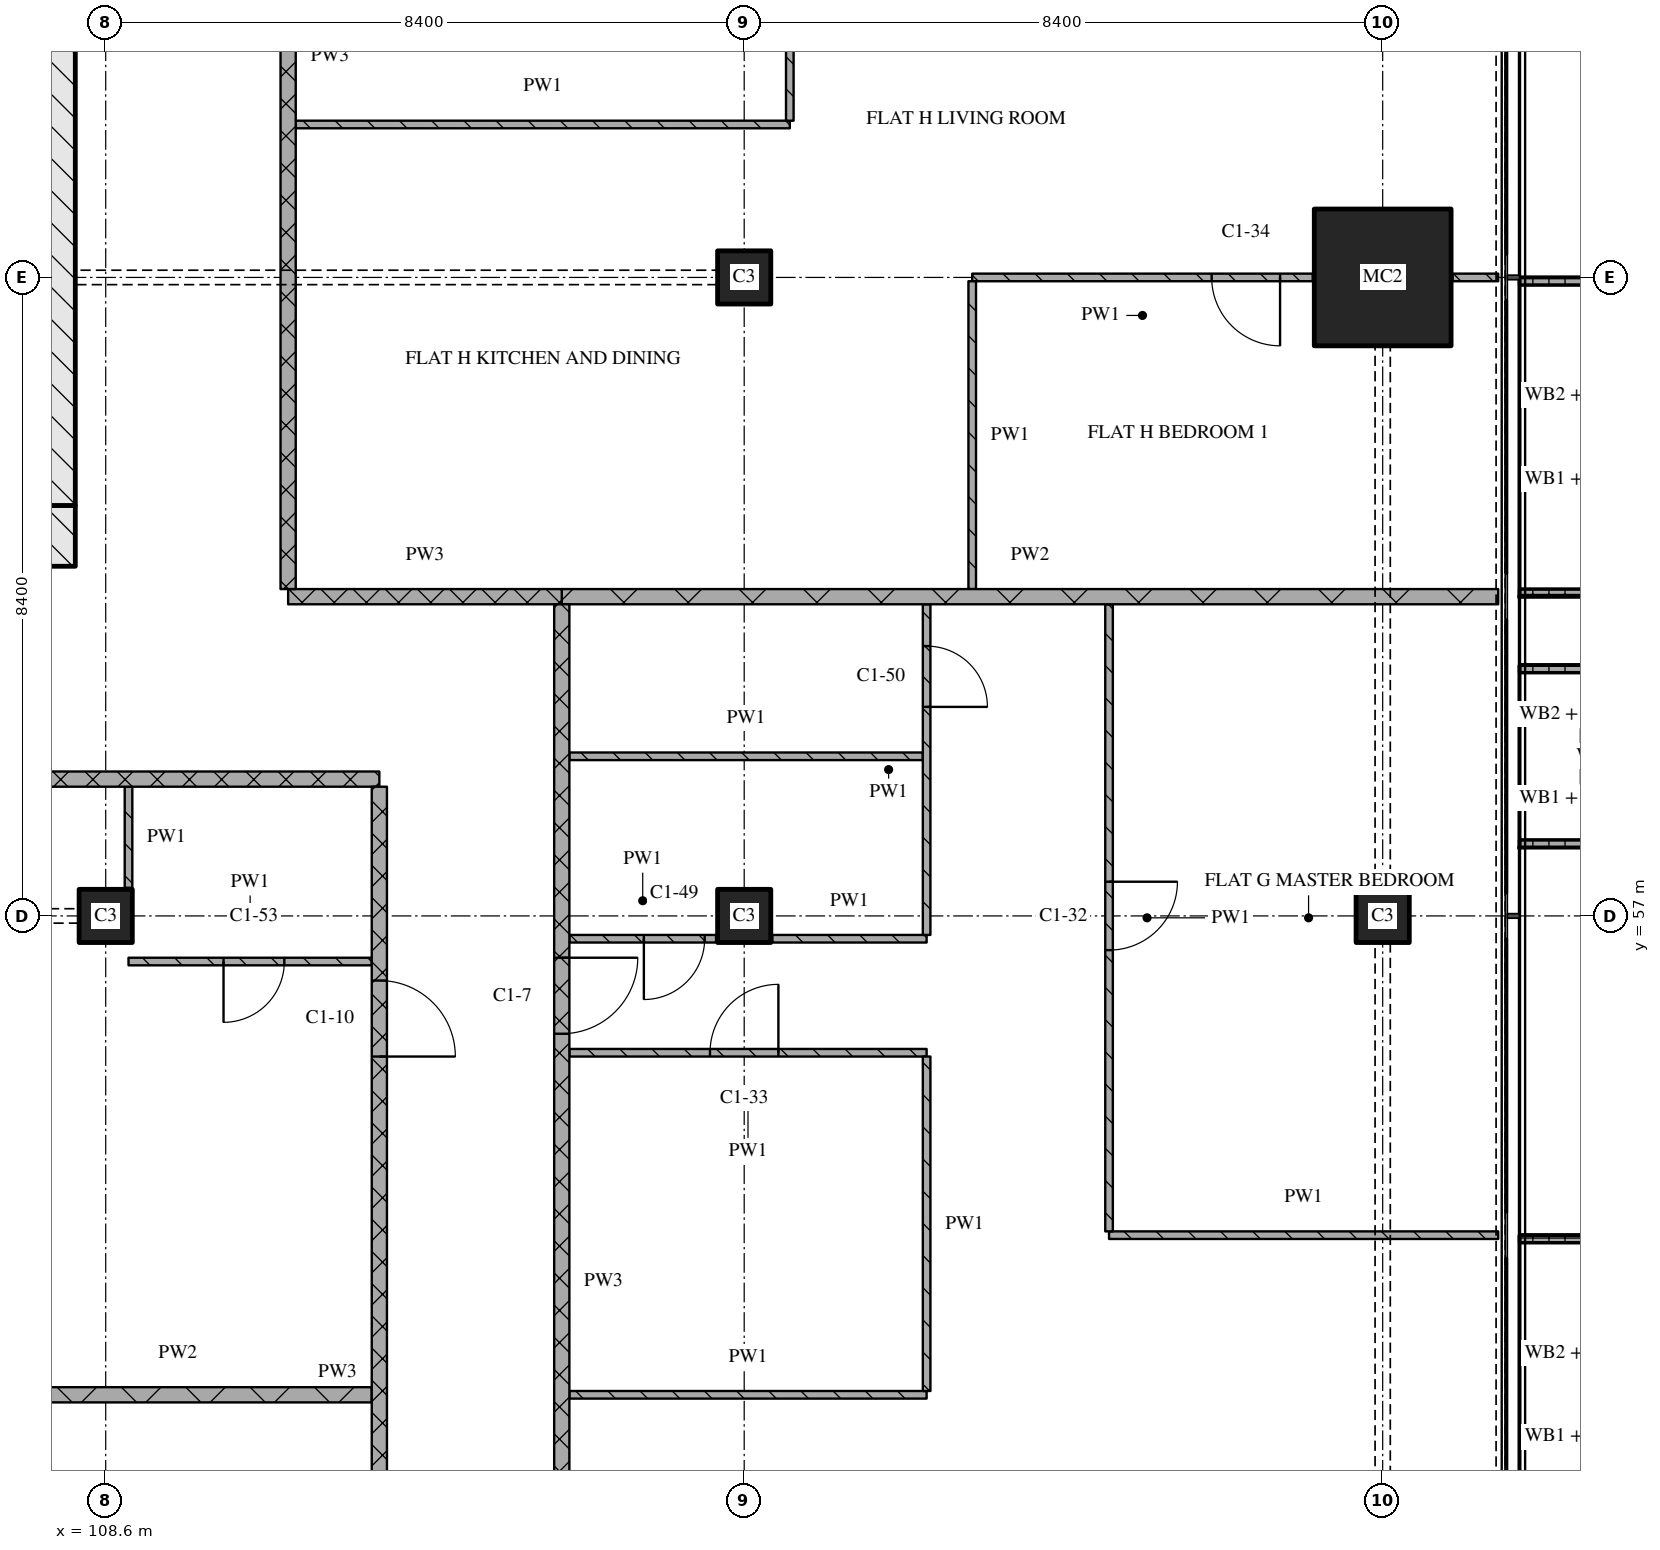
"""IFC4 building model, lengths in metres.
Left out: names, types, materials, properties, quantities, classifications, styles, units other than length and angle.
Written with IfcOpenShell. Run it as: python <this file> out.ifc"""

import sys

from ifc_helpers import new_model, si_unit, direction, frame, frame_2d, origin, origin_2d, place, context, subcontext, project, spatial, polyline, rectangle, outline, extrude, element, fill, save


model = new_model("IFC4")
c1 = context("Model", 3, precision=1e-05, world=origin(), true_north=direction((0.0, 1.0)))
c2 = subcontext(c1, "Body", "Model", "MODEL_VIEW")
j1 = project(units=[si_unit("LENGTHUNIT", "METRE"), si_unit("PLANEANGLEUNIT", "RADIAN")], contexts=[c1])
p1 = place(None, origin())
s1 = spatial("IfcSite", under=j1, at=p1, CompositionType="ELEMENT")
p2 = place(p1, origin())
s2 = spatial("IfcBuilding", under=s1, at=p2, CompositionType="ELEMENT")
p3 = place(p2, frame((0.0, 0.0, 154.65)))
s3 = spatial("IfcBuildingStorey", under=s2, at=p3, CompositionType="ELEMENT", Elevation=154.65)
for number, where, z_axis, x_axis in (
    (1, (108.6, 57.0, 0.0), (0.0, 0.0, 1.0), (1.0, 0.0, 0.0)),
    (2, (117.0, 57.0, 0.0), (0.0, 0.0, 1.0), (1.0, 0.0, 0.0)),
    (3, (117.0, 65.4, 0.0), (0.0, 0.0, 1.0), (1.0, 0.0, 0.0)),
    (4, (125.4, 57.0, 0.0), (0.0, 0.0, 1.0), (1.0, 0.0, 0.0)),
):
    element("IfcColumn", number, at=place(p3, frame(where, z_axis=z_axis, x_axis=x_axis)), inside=s3, PredefinedType="COLUMN", context=c2, shape_type="SweptSolid", body=[
        extrude(rectangle(XDim=0.7, YDim=0.7, at=origin_2d()), origin(), (0.0, 0.0, 1.0), 3.6),
    ])
p4 = place(p3, frame((125.4, 65.4, 0.0), z_axis=(0.0, 0.0, 1.0), x_axis=(1.0, 0.0, 0.0)))
e5 = element("IfcColumn", 5, at=p4, inside=s3, PredefinedType="COLUMN", context=c2, shape_type="SweptSolid", body=[
    extrude(rectangle(XDim=1.8, YDim=1.8, at=origin_2d()), origin(), (0.0, 0.0, 1.0), 3.6),
])
p5 = place(p3, origin())
e6 = element("IfcWall", 6, at=p5, inside=s3, PredefinedType="SOLIDWALL", context=c2, shape_type="SweptSolid", body=[
    extrude(outline(polyline([(127.2, 48.6), (127.2, 48.7), (128.833, 48.7), (128.833, 52.7), (127.2, 52.7), (127.2, 52.8), (128.933, 52.8), (128.933, 48.6), (127.2, 48.6)])), origin(), (0.0, 0.0, 1.0), 1.0),
])
p6 = place(p3, origin())
e7 = element("IfcWall", 7, at=p6, inside=s3, PredefinedType="SOLIDWALL", context=c2, shape_type="SweptSolid", body=[
    extrude(outline(polyline([(127.2, 57.9), (127.2, 58.0), (128.7, 58.0), (128.7, 60.2), (127.2, 60.2), (127.2, 60.3), (128.8, 60.3), (128.8, 57.9), (127.2, 57.9)])), origin(), (0.0, 0.0, 1.0), 1.0),
])
p7 = place(p3, origin())
e8 = element("IfcWall", 8, at=p7, inside=s3, PredefinedType="SOLIDWALL", context=c2, shape_type="SweptSolid", body=[
    extrude(outline(polyline([(127.2, 61.2), (127.2, 61.3), (128.833, 61.3), (128.833, 65.3), (127.2, 65.3), (127.2, 65.4), (128.933, 65.4), (128.933, 61.2), (127.2, 61.2)])), origin(), (0.0, 0.0, 1.0), 1.0),
])
p8 = place(p3, frame((67.0, 62.0, 0.0), z_axis=(0.0, 0.0, 1.0), x_axis=(1.0, 0.0, 0.0)))
e9 = element("IfcWall", 9, at=p8, inside=s3, PredefinedType="SOLIDWALL", context=c2, shape_type="SweptSolid", body=[
    extrude(rectangle(XDim=41.2, YDim=0.8, at=frame_2d((20.6, 0.0))), origin(), (0.0, 0.0, 1.0), 3.32),
])
p9 = place(p8, frame((20.95, 0.0, 0.0)))
e10 = element("IfcOpeningElement", 10, at=p9, cuts=e9, PredefinedType="OPENING", context=c2, shape_type="SweptSolid", body=[
    extrude(rectangle(XDim=1.8, YDim=2.1, at=frame_2d((0.9, 1.05))), frame((0.0, 0.41, 0.0), z_axis=(0.0, -1.0, 0.0), x_axis=(1.0, 0.0, 0.0)), (0.0, 0.0, 1.0), 0.82),
])
p10 = place(p3, frame((107.8, 62.4, 0.0), z_axis=(0.0, 0.0, 1.0), x_axis=(0.0, 1.0, 0.0)))
e11 = element("IfcWall", 11, at=p10, inside=s3, PredefinedType="SOLIDWALL", context=c2, shape_type="SweptSolid", body=[
    extrude(rectangle(XDim=12.0, YDim=0.8, at=frame_2d((6.0, 0.0))), origin(), (0.0, 0.0, 1.0), 3.32),
])
p11 = place(p10, frame((6.45, 0.0, 0.0)))
e12 = element("IfcOpeningElement", 12, at=p11, cuts=e11, PredefinedType="OPENING", context=c2, shape_type="SweptSolid", body=[
    extrude(rectangle(XDim=1.2, YDim=2.1, at=frame_2d((0.6, 1.05))), frame((0.0, 0.41, 0.0), z_axis=(0.0, -1.0, 0.0), x_axis=(1.0, 0.0, 0.0)), (0.0, 0.0, 1.0), 0.82),
])
p12 = place(p3, frame((107.0, 50.7, 0.0), z_axis=(0.0, 0.0, 1.0), x_axis=(1.0, 0.0, 0.0)))
e13 = element("IfcWall", 13, at=p12, inside=s3, PredefinedType="PARTITIONING", context=c2, shape_type="SweptSolid", body=[
    extrude(rectangle(XDim=5.1, YDim=0.2, at=frame_2d((2.55, 0.0))), origin(), (0.0, 0.0, 1.0), 3.32),
])
p13 = place(p3, frame((114.7, 50.7, 0.0), z_axis=(0.0, 0.0, 1.0), x_axis=(1.0, 0.0, 0.0)))
e14 = element("IfcWall", 14, at=p13, inside=s3, PredefinedType="PARTITIONING", context=c2, shape_type="SweptSolid", body=[
    extrude(rectangle(XDim=4.7, YDim=0.1, at=frame_2d((2.35, 0.0))), origin(), (0.0, 0.0, 1.0), 3.32),
])
p14 = place(p3, frame((121.8, 52.8, 0.0), z_axis=(0.0, 0.0, 1.0), x_axis=(1.0, 0.0, 0.0)))
e15 = element("IfcWall", 15, at=p14, inside=s3, PredefinedType="PARTITIONING", context=c2, shape_type="SweptSolid", body=[
    extrude(rectangle(XDim=5.12, YDim=0.1, at=frame_2d((2.56, 0.0))), origin(), (0.0, 0.0, 1.0), 3.32),
])
p15 = place(p3, frame((119.4, 55.2, 0.0), z_axis=(0.0, 0.0, 1.0), x_axis=(-1.0, 0.0, 0.0)))
e16 = element("IfcWall", 16, at=p15, inside=s3, PredefinedType="PARTITIONING", context=c2, shape_type="SweptSolid", body=[
    extrude(rectangle(XDim=4.7, YDim=0.1, at=frame_2d((2.35, 0.0))), origin(), (0.0, 0.0, 1.0), 3.32),
])
p16 = place(p15, frame((1.95, 0.0, 0.0)))
e17 = element("IfcOpeningElement", 17, at=p16, cuts=e16, PredefinedType="OPENING", context=c2, shape_type="SweptSolid", body=[
    extrude(rectangle(XDim=0.9, YDim=2.1, at=frame_2d((0.45, 1.05))), frame((0.0, 0.06, 0.0), z_axis=(0.0, -1.0, 0.0), x_axis=(1.0, 0.0, 0.0)), (0.0, 0.0, 1.0), 0.12),
])
p17 = place(p3, frame((108.9, 56.4, 0.0), z_axis=(0.0, 0.0, 1.0), x_axis=(1.0, 0.0, 0.0)))
e18 = element("IfcWall", 18, at=p17, inside=s3, PredefinedType="PARTITIONING", context=c2, shape_type="SweptSolid", body=[
    extrude(rectangle(XDim=3.2, YDim=0.1, at=frame_2d((1.6, 0.0))), origin(), (0.0, 0.0, 1.0), 3.32),
])
p18 = place(p17, frame((1.25, 0.0, 0.0)))
e19 = element("IfcOpeningElement", 19, at=p18, cuts=e18, PredefinedType="OPENING", context=c2, shape_type="SweptSolid", body=[
    extrude(rectangle(XDim=0.8, YDim=2.1, at=frame_2d((0.4, 1.05))), frame((0.0, 0.06, 0.0), z_axis=(0.0, -1.0, 0.0), x_axis=(1.0, 0.0, 0.0)), (0.0, 0.0, 1.0), 0.12),
])
p19 = place(p3, frame((114.7, 56.7, 0.0), z_axis=(0.0, 0.0, 1.0), x_axis=(1.0, 0.0, 0.0)))
e20 = element("IfcWall", 20, at=p19, inside=s3, PredefinedType="PARTITIONING", context=c2, shape_type="SweptSolid", body=[
    extrude(rectangle(XDim=1.93, YDim=0.1, at=frame_2d((0.965, 0.0))), origin(), (0.0, 0.0, 1.0), 3.32),
])
p20 = place(p19, frame((0.98, 0.0, 0.0)))
e21 = element("IfcOpeningElement", 21, at=p20, cuts=e20, PredefinedType="OPENING", context=c2, shape_type="SweptSolid", body=[
    extrude(rectangle(XDim=0.8, YDim=2.1, at=frame_2d((0.4, 1.05))), frame((0.0, 0.06, 0.0), z_axis=(0.0, -1.0, 0.0), x_axis=(1.0, 0.0, 0.0)), (0.0, 0.0, 1.0), 0.12),
])
p21 = place(p3, frame((117.37, 56.7, 0.0), z_axis=(0.0, 0.0, 1.0), x_axis=(1.0, 0.0, 0.0)))
e22 = element("IfcWall", 22, at=p21, inside=s3, PredefinedType="PARTITIONING", context=c2, shape_type="SweptSolid", body=[
    extrude(rectangle(XDim=2.03, YDim=0.1, at=frame_2d((1.015, 0.0))), origin(), (0.0, 0.0, 1.0), 3.32),
])
p22 = place(p3, frame((101.4, 58.8, 0.0), z_axis=(0.0, 0.0, 1.0), x_axis=(1.0, 0.0, 0.0)))
e23 = element("IfcWall", 23, at=p22, inside=s3, PredefinedType="PARTITIONING", context=c2, shape_type="SweptSolid", body=[
    extrude(rectangle(XDim=10.8, YDim=0.2, at=frame_2d((5.4, 0.0))), origin(), (0.0, 0.0, 1.0), 3.32),
])
p23 = place(p3, frame((114.7, 59.1, 0.0), z_axis=(0.0, 0.0, 1.0), x_axis=(1.0, 0.0, 0.0)))
e24 = element("IfcWall", 24, at=p23, inside=s3, PredefinedType="PARTITIONING", context=c2, shape_type="SweptSolid", body=[
    extrude(rectangle(XDim=4.65, YDim=0.1, at=frame_2d((2.325, 0.0))), origin(), (0.0, 0.0, 1.0), 3.32),
])
p24 = place(p3, frame((111.0, 61.2, 0.0), z_axis=(0.0, 0.0, 1.0), x_axis=(1.0, 0.0, 0.0)))
e25 = element("IfcWall", 25, at=p24, inside=s3, PredefinedType="PARTITIONING", context=c2, shape_type="SweptSolid", body=[
    extrude(rectangle(XDim=3.6, YDim=0.2, at=frame_2d((1.8, 0.0))), origin(), (0.0, 0.0, 1.0), 3.32),
])
p25 = place(p3, frame((114.6, 61.2, 0.0), z_axis=(0.0, 0.0, 1.0), x_axis=(1.0, 0.0, 0.0)))
e26 = element("IfcWall", 26, at=p25, inside=s3, PredefinedType="PARTITIONING", context=c2, shape_type="SweptSolid", body=[
    extrude(rectangle(XDim=12.32, YDim=0.2, at=frame_2d((6.16, 0.0))), origin(), (0.0, 0.0, 1.0), 3.32),
])
p26 = place(p3, frame((124.48, 65.4, 0.0), z_axis=(0.0, 0.0, 1.0), x_axis=(-1.0, 0.0, 0.0)))
e27 = element("IfcWall", 27, at=p26, inside=s3, PredefinedType="PARTITIONING", context=c2, shape_type="SweptSolid", body=[
    extrude(rectangle(XDim=4.48, YDim=0.1, at=frame_2d((2.24, 0.0))), origin(), (0.0, 0.0, 1.0), 3.32),
])
p27 = place(p26, frame((0.43, 0.0, 0.0)))
e28 = element("IfcOpeningElement", 28, at=p27, cuts=e27, PredefinedType="OPENING", context=c2, shape_type="SweptSolid", body=[
    extrude(rectangle(XDim=0.9, YDim=2.1, at=frame_2d((0.45, 1.05))), frame((0.0, 0.06, 0.0), z_axis=(0.0, -1.0, 0.0), x_axis=(1.0, 0.0, 0.0)), (0.0, 0.0, 1.0), 0.12),
])
p28 = place(p3, frame((126.32, 65.4, 0.0), z_axis=(0.0, 0.0, 1.0), x_axis=(1.0, 0.0, 0.0)))
e29 = element("IfcWall", 29, at=p28, inside=s3, PredefinedType="PARTITIONING", context=c2, shape_type="SweptSolid", body=[
    extrude(rectangle(XDim=0.6, YDim=0.1, at=frame_2d((0.3, 0.0))), origin(), (0.0, 0.0, 1.0), 3.32),
])
p29 = place(p3, frame((111.1, 67.412, 0.0), z_axis=(0.0, 0.0, 1.0), x_axis=(1.0, 0.0, 0.0)))
e30 = element("IfcWall", 30, at=p29, inside=s3, PredefinedType="PARTITIONING", context=c2, shape_type="SweptSolid", body=[
    extrude(rectangle(XDim=6.5, YDim=0.1, at=frame_2d((3.25, 0.0))), origin(), (0.0, 0.0, 1.0), 3.32),
])
p30 = place(p3, frame((108.9, 58.7, 0.0), z_axis=(0.0, 0.0, 1.0), x_axis=(0.0, -1.0, 0.0)))
e31 = element("IfcWall", 31, at=p30, inside=s3, PredefinedType="PARTITIONING", context=c2, shape_type="SweptSolid", body=[
    extrude(rectangle(XDim=1.33, YDim=0.1, at=frame_2d((0.665, 0.0))), origin(), (0.0, 0.0, 1.0), 3.32),
])
p31 = place(p3, frame((111.0, 75.32, 0.0), z_axis=(0.0, 0.0, 1.0), x_axis=(0.0, -1.0, 0.0)))
e32 = element("IfcWall", 32, at=p31, inside=s3, PredefinedType="PARTITIONING", context=c2, shape_type="SweptSolid", body=[
    extrude(rectangle(XDim=14.02, YDim=0.2, at=frame_2d((7.01, 0.0))), origin(), (0.0, 0.0, 1.0), 3.32),
])
p32 = place(p31, frame((3.57, 0.0, 0.0)))
e33 = element("IfcOpeningElement", 33, at=p32, cuts=e32, PredefinedType="OPENING", context=c2, shape_type="SweptSolid", body=[
    extrude(rectangle(XDim=1.0, YDim=2.1, at=frame_2d((0.5, 1.05))), frame((0.0, 0.11, 0.0), z_axis=(0.0, -1.0, 0.0), x_axis=(1.0, 0.0, 0.0)), (0.0, 0.0, 1.0), 0.22),
])
p33 = place(p3, frame((112.2, 43.3, 0.0), z_axis=(0.0, 0.0, 1.0), x_axis=(0.0, 1.0, 0.0)))
e34 = element("IfcWall", 34, at=p33, inside=s3, PredefinedType="PARTITIONING", context=c2, shape_type="SweptSolid", body=[
    extrude(rectangle(XDim=15.4, YDim=0.2, at=frame_2d((7.7, 0.0))), origin(), (0.0, 0.0, 1.0), 3.32),
])
p34 = place(p33, frame((11.85, 0.0, 0.0)))
e35 = element("IfcOpeningElement", 35, at=p34, cuts=e34, PredefinedType="OPENING", context=c2, shape_type="SweptSolid", body=[
    extrude(rectangle(XDim=1.0, YDim=2.1, at=frame_2d((0.5, 1.05))), frame((0.0, 0.11, 0.0), z_axis=(0.0, -1.0, 0.0), x_axis=(1.0, 0.0, 0.0)), (0.0, 0.0, 1.0), 0.22),
])
p35 = place(p3, frame((114.6, 61.1, 0.0), z_axis=(0.0, 0.0, 1.0), x_axis=(0.0, -1.0, 0.0)))
e36 = element("IfcWall", 36, at=p35, inside=s3, PredefinedType="PARTITIONING", context=c2, shape_type="SweptSolid", body=[
    extrude(rectangle(XDim=17.8, YDim=0.2, at=frame_2d((8.9, 0.0))), origin(), (0.0, 0.0, 1.0), 3.32),
])
p36 = place(p35, frame((4.65, 0.0, 0.0)))
e37 = element("IfcOpeningElement", 37, at=p36, cuts=e36, PredefinedType="OPENING", context=c2, shape_type="SweptSolid", body=[
    extrude(rectangle(XDim=1.0, YDim=2.1, at=frame_2d((0.5, 1.05))), frame((0.0, 0.11, 0.0), z_axis=(0.0, -1.0, 0.0), x_axis=(1.0, 0.0, 0.0)), (0.0, 0.0, 1.0), 0.22),
])
p37 = place(p3, frame((117.6, 70.45, 0.0), z_axis=(0.0, 0.0, 1.0), x_axis=(0.0, -1.0, 0.0)))
e38 = element("IfcWall", 38, at=p37, inside=s3, PredefinedType="PARTITIONING", context=c2, shape_type="SweptSolid", body=[
    extrude(rectangle(XDim=2.988, YDim=0.1, at=frame_2d((1.494, 0.0))), origin(), (0.0, 0.0, 1.0), 3.32),
])
p38 = place(p3, frame((119.4, 55.15, 0.0), z_axis=(0.0, 0.0, 1.0), x_axis=(0.0, -1.0, 0.0)))
e39 = element("IfcWall", 39, at=p38, inside=s3, PredefinedType="PARTITIONING", context=c2, shape_type="SweptSolid", body=[
    extrude(rectangle(XDim=4.4, YDim=0.1, at=frame_2d((2.2, 0.0))), origin(), (0.0, 0.0, 1.0), 3.32),
])
p39 = place(p3, frame((119.4, 56.75, 0.0), z_axis=(0.0, 0.0, 1.0), x_axis=(0.0, 1.0, 0.0)))
e40 = element("IfcWall", 40, at=p39, inside=s3, PredefinedType="PARTITIONING", context=c2, shape_type="SweptSolid", body=[
    extrude(rectangle(XDim=4.35, YDim=0.1, at=frame_2d((2.175, 0.0))), origin(), (0.0, 0.0, 1.0), 3.32),
])
p40 = place(p39, frame((3.0, 0.0, 0.0)))
e41 = element("IfcOpeningElement", 41, at=p40, cuts=e40, PredefinedType="OPENING", context=c2, shape_type="SweptSolid", body=[
    extrude(rectangle(XDim=0.8, YDim=2.1, at=frame_2d((0.4, 1.05))), frame((0.0, 0.06, 0.0), z_axis=(0.0, -1.0, 0.0), x_axis=(1.0, 0.0, 0.0)), (0.0, 0.0, 1.0), 0.12),
])
p41 = place(p3, frame((120.0, 65.35, 0.0), z_axis=(0.0, 0.0, 1.0), x_axis=(0.0, -1.0, 0.0)))
e42 = element("IfcWall", 42, at=p41, inside=s3, PredefinedType="PARTITIONING", context=c2, shape_type="SweptSolid", body=[
    extrude(rectangle(XDim=4.05, YDim=0.1, at=frame_2d((2.025, 0.0))), origin(), (0.0, 0.0, 1.0), 3.32),
])
p42 = place(p3, frame((121.8, 61.1, 0.0), z_axis=(0.0, 0.0, 1.0), x_axis=(0.0, -1.0, 0.0)))
e43 = element("IfcWall", 43, at=p42, inside=s3, PredefinedType="PARTITIONING", context=c2, shape_type="SweptSolid", body=[
    extrude(rectangle(XDim=8.25, YDim=0.1, at=frame_2d((4.125, 0.0))), origin(), (0.0, 0.0, 1.0), 3.32),
])
p43 = place(p42, frame((3.65, 0.0, 0.0)))
e44 = element("IfcOpeningElement", 44, at=p43, cuts=e43, PredefinedType="OPENING", context=c2, shape_type="SweptSolid", body=[
    extrude(rectangle(XDim=0.9, YDim=2.1, at=frame_2d((0.45, 1.05))), frame((0.0, 0.06, 0.0), z_axis=(0.0, -1.0, 0.0), x_axis=(1.0, 0.0, 0.0)), (0.0, 0.0, 1.0), 0.12),
])
p44 = place(p16, origin())
e45 = element("IfcDoor", 45, at=p44, inside=s3, OperationType="SINGLE_SWING_RIGHT", PredefinedType="DOOR", context=c2, shape_type="SweptSolid", body=[
    extrude(rectangle(XDim=0.9, YDim=2.1, at=frame_2d((0.45, 1.05))), frame((0.0, 0.025, 0.0), z_axis=(0.0, -1.0, 0.0), x_axis=(1.0, 0.0, 0.0)), (0.0, 0.0, 1.0), 0.05),
])
fill(e17, e45)
p45 = place(p18, origin())
e46 = element("IfcDoor", 46, at=p45, inside=s3, OperationType="SINGLE_SWING_RIGHT", PredefinedType="DOOR", context=c2, shape_type="SweptSolid", body=[
    extrude(rectangle(XDim=0.8, YDim=2.1, at=frame_2d((0.4, 1.05))), frame((0.0, 0.025, 0.0), z_axis=(0.0, -1.0, 0.0), x_axis=(1.0, 0.0, 0.0)), (0.0, 0.0, 1.0), 0.05),
])
fill(e19, e46)
p46 = place(p20, origin())
e47 = element("IfcDoor", 47, at=p46, inside=s3, OperationType="SINGLE_SWING_RIGHT", PredefinedType="DOOR", context=c2, shape_type="SweptSolid", body=[
    extrude(rectangle(XDim=0.8, YDim=2.1, at=frame_2d((0.4, 1.05))), frame((0.0, 0.025, 0.0), z_axis=(0.0, -1.0, 0.0), x_axis=(1.0, 0.0, 0.0)), (0.0, 0.0, 1.0), 0.05),
])
fill(e21, e47)
p47 = place(p27, origin())
e48 = element("IfcDoor", 48, at=p47, inside=s3, OperationType="SINGLE_SWING_LEFT", PredefinedType="DOOR", context=c2, shape_type="SweptSolid", body=[
    extrude(rectangle(XDim=0.9, YDim=2.1, at=frame_2d((0.45, 1.05))), frame((0.0, 0.025, 0.0), z_axis=(0.0, -1.0, 0.0), x_axis=(1.0, 0.0, 0.0)), (0.0, 0.0, 1.0), 0.05),
])
fill(e28, e48)
p48 = place(p34, origin())
e49 = element("IfcDoor", 49, at=p48, inside=s3, OperationType="SINGLE_SWING_RIGHT", PredefinedType="DOOR", context=c2, shape_type="SweptSolid", body=[
    extrude(rectangle(XDim=1.0, YDim=2.1, at=frame_2d((0.5, 1.05))), frame((0.0, 0.025, 0.0), z_axis=(0.0, -1.0, 0.0), x_axis=(1.0, 0.0, 0.0)), (0.0, 0.0, 1.0), 0.05),
])
fill(e35, e49)
p49 = place(p36, origin())
e50 = element("IfcDoor", 50, at=p49, inside=s3, OperationType="SINGLE_SWING_LEFT", PredefinedType="DOOR", context=c2, shape_type="SweptSolid", body=[
    extrude(rectangle(XDim=1.0, YDim=2.1, at=frame_2d((0.5, 1.05))), frame((0.0, 0.025, 0.0), z_axis=(0.0, -1.0, 0.0), x_axis=(1.0, 0.0, 0.0)), (0.0, 0.0, 1.0), 0.05),
])
fill(e37, e50)
p50 = place(p40, origin())
e51 = element("IfcDoor", 51, at=p50, inside=s3, OperationType="SINGLE_SWING_RIGHT", PredefinedType="DOOR", context=c2, shape_type="SweptSolid", body=[
    extrude(rectangle(XDim=0.8, YDim=2.1, at=frame_2d((0.4, 1.05))), frame((0.0, 0.025, 0.0), z_axis=(0.0, -1.0, 0.0), x_axis=(1.0, 0.0, 0.0)), (0.0, 0.0, 1.0), 0.05),
])
fill(e41, e51)
p51 = place(p43, origin())
e52 = element("IfcDoor", 52, at=p51, inside=s3, OperationType="SINGLE_SWING_LEFT", PredefinedType="DOOR", context=c2, shape_type="SweptSolid", body=[
    extrude(rectangle(XDim=0.9, YDim=2.1, at=frame_2d((0.45, 1.05))), frame((0.0, 0.025, 0.0), z_axis=(0.0, -1.0, 0.0), x_axis=(1.0, 0.0, 0.0)), (0.0, 0.0, 1.0), 0.05),
])
fill(e44, e52)
save(model, sys.argv[1])
